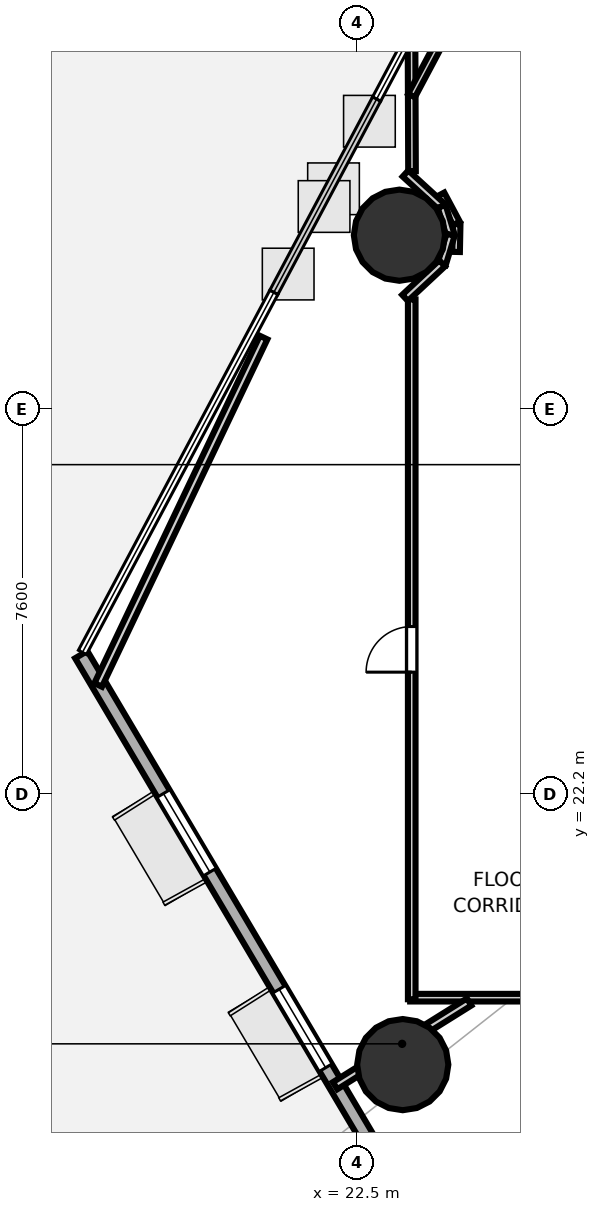
"""IFC4 building model, lengths in metres.
Left out: names, types, materials, properties, quantities, classifications, styles, units other than length and angle.
Written with IfcOpenShell. Run it as: python <this file> out.ifc"""

import sys

from ifc_helpers import new_model, si_unit, direction, frame, frame_2d, origin, origin_2d, place, context, subcontext, project, spatial, rectangle, hollow_circle, extrude, element, fill, save


model = new_model("IFC4")
c1 = context("Model", 3, precision=1e-05, world=origin(), true_north=direction((0.0, 1.0)))
c2 = subcontext(c1, "Body", "Model", "MODEL_VIEW")
j1 = project(units=[si_unit("LENGTHUNIT", "METRE"), si_unit("PLANEANGLEUNIT", "RADIAN")], contexts=[c1])
p1 = place(None, origin())
s1 = spatial("IfcSite", under=j1, at=p1, CompositionType="ELEMENT")
p2 = place(p1, origin())
s2 = spatial("IfcBuilding", under=s1, at=p2, CompositionType="ELEMENT")
p3 = place(p2, frame((0.0, 0.0, 25.7)))
s3 = spatial("IfcBuildingStorey", under=s2, at=p3, CompositionType="ELEMENT", Elevation=25.7)
for number, where, z_axis, x_axis in (
    (1, (23.338, 33.228, 0.0), (0.0, 0.0, 1.0), (1.0, 0.0, 0.0)),
    (2, (23.404, 16.86, 0.0), (0.0, 0.0, 1.0), (1.0, 0.0, 0.0)),
):
    element("IfcColumn", number, at=place(p3, frame(where, z_axis=z_axis, x_axis=x_axis)), inside=s3, PredefinedType="COLUMN", context=c2, shape_type="SweptSolid", body=[
        extrude(hollow_circle(Radius=0.9, WallThickness=0.045, at=origin_2d()), origin(), (0.0, 0.0, 1.0), 3.7),
    ])
p4 = place(p3, frame((17.059, 24.951, 0.0), z_axis=(0.0, 0.0, 1.0), x_axis=(0.509260190146, -0.860612606655, 0.0)))
e3 = element("IfcWall", 3, at=p4, inside=s3, PredefinedType="SOLIDWALL", context=c2, shape_type="SweptSolid", body=[
    extrude(rectangle(XDim=13.616, YDim=0.28, at=frame_2d((6.808, 0.0))), origin(), (0.0, 0.0, 1.0), 3.52),
])
p5 = place(p4, frame((3.185, 0.0, 0.85)))
e4 = element("IfcOpeningElement", 4, at=p5, cuts=e3, PredefinedType="OPENING", context=c2, shape_type="SweptSolid", body=[
    extrude(rectangle(XDim=1.8, YDim=2.1, at=frame_2d((0.9, 1.05))), frame((0.0, 0.15, 0.0), z_axis=(0.0, -1.0, 0.0), x_axis=(1.0, 0.0, 0.0)), (0.0, 0.0, 1.0), 0.3),
])
p6 = place(p4, frame((7.672, 0.0, 0.85)))
e5 = element("IfcOpeningElement", 5, at=p6, cuts=e3, PredefinedType="OPENING", context=c2, shape_type="SweptSolid", body=[
    extrude(rectangle(XDim=1.8, YDim=2.1, at=frame_2d((0.9, 1.05))), frame((0.0, 0.15, 0.0), z_axis=(0.0, -1.0, 0.0), x_axis=(1.0, 0.0, 0.0)), (0.0, 0.0, 1.0), 0.3),
])
p7 = place(p3, frame((24.464, 33.461, 0.0), z_axis=(0.0, 0.0, 1.0), x_axis=(-0.4715232649, 0.881853622014, 0.0)))
e6 = element("IfcWall", 6, at=p7, inside=s3, PredefinedType="PARTITIONING", context=c2, shape_type="SweptSolid", body=[
    extrude(rectangle(XDim=0.65, YDim=0.15, at=frame_2d((0.325, 0.0))), origin(), (0.0, 0.0, 1.0), 2.798),
])
p8 = place(p3, frame((23.587, 34.491, 0.0), z_axis=(0.0, 0.0, 1.0), x_axis=(-0.003745626092, 0.999992985118, 0.0)))
e7 = element("IfcWall", 7, at=p8, inside=s3, PredefinedType="PARTITIONING", context=c2, shape_type="SweptSolid", body=[
    extrude(rectangle(XDim=2.738, YDim=0.15, at=frame_2d((1.369, 0.0))), origin(), (0.0, 0.0, 1.0), 2.84),
])
p9 = place(p3, frame((23.577, 35.984, 0.0), z_axis=(0.0, 0.0, 1.0), x_axis=(0.469485142528, 0.882940372248, 0.0)))
e8 = element("IfcWall", 8, at=p9, inside=s3, PredefinedType="PARTITIONING", context=c2, shape_type="SweptSolid", body=[
    extrude(rectangle(XDim=6.113, YDim=0.15, at=frame_2d((3.057, 0.0))), origin(), (0.0, 0.0, 1.0), 2.84),
])
p10 = place(p3, frame((33.32, 18.181, 0.0), z_axis=(0.0, 0.0, 1.0), x_axis=(-1.0, 0.0, 0.0)))
e9 = element("IfcWall", 9, at=p10, inside=s3, PredefinedType="PARTITIONING", context=c2, shape_type="SweptSolid", body=[
    extrude(rectangle(XDim=9.77, YDim=0.15, at=frame_2d((4.885, 0.0))), origin(), (0.0, 0.0, 1.0), 2.798),
])
p11 = place(p10, frame((5.645, 0.0, 0.0)))
e10 = element("IfcOpeningElement", 10, at=p11, cuts=e9, PredefinedType="OPENING", context=c2, shape_type="SweptSolid", body=[
    extrude(rectangle(XDim=0.9, YDim=2.1, at=frame_2d((0.45, 1.05))), frame((0.0, 0.085, 0.0), z_axis=(0.0, -1.0, 0.0), x_axis=(1.0, 0.0, 0.0)), (0.0, 0.0, 1.0), 0.17),
])
p12 = place(p3, frame((23.581, 18.15, 0.0), z_axis=(0.0, 0.0, 1.0), x_axis=(0.0, 1.0, 0.0)))
e11 = element("IfcWall", 11, at=p12, inside=s3, PredefinedType="PARTITIONING", context=c2, shape_type="SweptSolid", body=[
    extrude(rectangle(XDim=13.81, YDim=0.15, at=frame_2d((6.905, 0.0))), origin(), (0.0, 0.0, 1.0), 2.798),
])
p13 = place(p12, frame((6.455, 0.0, 0.0)))
e12 = element("IfcOpeningElement", 12, at=p13, cuts=e11, PredefinedType="OPENING", context=c2, shape_type="SweptSolid", body=[
    extrude(rectangle(XDim=0.9, YDim=2.1, at=frame_2d((0.45, 1.05))), frame((0.0, 0.085, 0.0), z_axis=(0.0, -1.0, 0.0), x_axis=(1.0, 0.0, 0.0)), (0.0, 0.0, 1.0), 0.17),
])
p14 = place(p3, frame((24.457, 32.897, 0.0), z_axis=(0.0, 0.0, 1.0), x_axis=(0.020031598679, 0.999799347396, 0.0)))
e13 = element("IfcWall", 13, at=p14, inside=s3, PredefinedType="PARTITIONING", context=c2, shape_type="SweptSolid", body=[
    extrude(rectangle(XDim=0.548, YDim=0.15, at=frame_2d((0.274, 0.0))), origin(), (0.0, 0.0, 1.0), 2.84),
])
p15 = place(p3, frame((23.458, 34.445, 0.0), z_axis=(0.0, 0.0, 1.0), x_axis=(0.737422772015, -0.675431458635, 0.0)))
e14 = element("IfcWall", 14, at=p15, inside=s3, PredefinedType="PLUMBINGWALL", context=c2, shape_type="SweptSolid", body=[
    extrude(rectangle(XDim=0.981, YDim=0.165, at=frame_2d((0.49, 0.0))), origin(), (0.0, 0.0, 1.0), 2.798),
])
p16 = place(p3, frame((24.173, 33.797, 0.0), z_axis=(0.0, 0.0, 1.0), x_axis=(0.29038902353, -0.956908676423, 0.0)))
e15 = element("IfcWall", 15, at=p16, inside=s3, PredefinedType="PLUMBINGWALL", context=c2, shape_type="SweptSolid", body=[
    extrude(rectangle(XDim=0.604, YDim=0.165, at=frame_2d((0.302, 0.0))), origin(), (0.0, 0.0, 1.0), 2.798),
])
p17 = place(p3, frame((24.348, 33.237, 0.0), z_axis=(0.0, 0.0, 1.0), x_axis=(-0.29038902353, -0.956908676423, 0.0)))
e16 = element("IfcWall", 16, at=p17, inside=s3, PredefinedType="PLUMBINGWALL", context=c2, shape_type="SweptSolid", body=[
    extrude(rectangle(XDim=0.604, YDim=0.165, at=frame_2d((0.302, 0.0))), origin(), (0.0, 0.0, 1.0), 2.84),
])
p18 = place(p3, frame((24.181, 32.673, 0.0), z_axis=(0.0, 0.0, 1.0), x_axis=(-0.731428236436, -0.681918422499, 0.0)))
e17 = element("IfcWall", 17, at=p18, inside=s3, PredefinedType="PLUMBINGWALL", context=c2, shape_type="SweptSolid", body=[
    extrude(rectangle(XDim=1.001, YDim=0.165, at=frame_2d((0.5, 0.0))), origin(), (0.0, 0.0, 1.0), 2.798),
])
p19 = place(p3, frame((24.714, 18.096, 0.0), z_axis=(0.0, 0.0, 1.0), x_axis=(-0.848068672168, -0.529886334309, 0.0)))
e18 = element("IfcWall", 18, at=p19, inside=s3, PredefinedType="PLUMBINGWALL", context=c2, shape_type="SweptSolid", body=[
    extrude(rectangle(XDim=3.118, YDim=0.165, at=frame_2d((1.559, 0.0))), origin(), (0.0, 0.0, 1.0), 2.798),
])
p20 = place(p3, frame((17.393, 24.352, 0.0), z_axis=(0.0, 0.0, 1.0), x_axis=(0.429936076477, 0.902859330208, 0.0)))
e19 = element("IfcWall", 19, at=p20, inside=s3, PredefinedType="PLUMBINGWALL", context=c2, shape_type="SweptSolid", body=[
    extrude(rectangle(XDim=7.593, YDim=0.165, at=frame_2d((3.797, 0.0))), origin(), (0.0, 0.0, 1.0), 2.84),
])
p21 = place(p13, origin())
e20 = element("IfcDoor", 20, at=p21, inside=s3, OperationType="SINGLE_SWING_LEFT", PredefinedType="DOOR", context=c2, shape_type="SweptSolid", body=[
    extrude(rectangle(XDim=0.9, YDim=2.1, at=frame_2d((0.45, 1.05))), frame((0.0, 0.025, 0.0), z_axis=(0.0, -1.0, 0.0), x_axis=(1.0, 0.0, 0.0)), (0.0, 0.0, 1.0), 0.05),
])
fill(e12, e20)
p22 = place(p5, origin())
e21 = element("IfcWindow", 21, at=p22, inside=s3, PartitioningType="SINGLE_PANEL", PredefinedType="WINDOW", context=c2, shape_type="SweptSolid", body=[
    extrude(rectangle(XDim=1.8, YDim=2.1, at=frame_2d((0.9, 1.05))), frame((0.0, 0.03, 0.0), z_axis=(0.0, -1.0, 0.0), x_axis=(1.0, 0.0, 0.0)), (0.0, 0.0, 1.0), 0.06),
])
fill(e4, e21)
p23 = place(p6, origin())
e22 = element("IfcWindow", 22, at=p23, inside=s3, PartitioningType="SINGLE_PANEL", PredefinedType="WINDOW", context=c2, shape_type="SweptSolid", body=[
    extrude(rectangle(XDim=1.8, YDim=2.1, at=frame_2d((0.9, 1.05))), frame((0.0, 0.03, 0.0), z_axis=(0.0, -1.0, 0.0), x_axis=(1.0, 0.0, 0.0)), (0.0, 0.0, 1.0), 0.06),
])
fill(e5, e22)
save(model, sys.argv[1])
